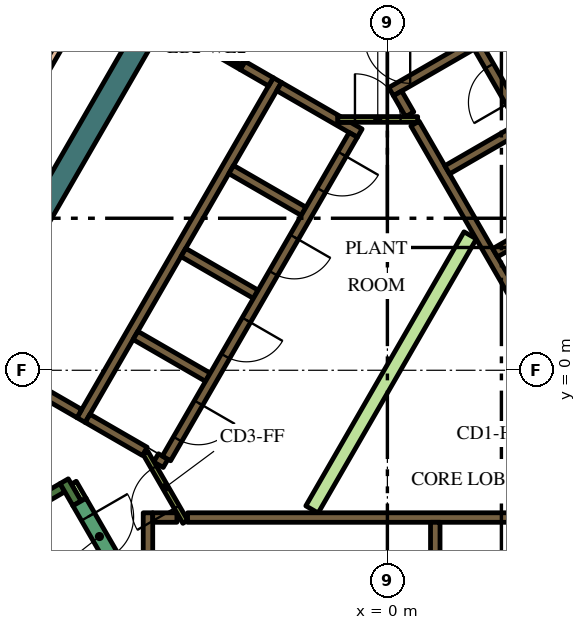
"""IFC4 building model, lengths in metres.
Left out: names, types, materials, properties, quantities, classifications, styles, units other than length and angle.
Written with IfcOpenShell. Run it as: python <this file> out.ifc"""

import sys

from ifc_helpers import new_model, si_unit, direction, frame, frame_2d, origin, place, context, subcontext, project, spatial, polyline, rectangle, outline, extrude, element, fill, save


model = new_model("IFC4")
c1 = context("Model", 3, precision=1e-05, world=origin(), true_north=direction((0.0, 1.0)))
c2 = subcontext(c1, "Body", "Model", "MODEL_VIEW")
j1 = project(units=[si_unit("LENGTHUNIT", "METRE"), si_unit("PLANEANGLEUNIT", "RADIAN")], contexts=[c1])
p1 = place(None, origin())
s1 = spatial("IfcSite", under=j1, at=p1, CompositionType="ELEMENT")
p2 = place(p1, origin())
s2 = spatial("IfcBuilding", under=s1, at=p2, CompositionType="ELEMENT")
p3 = place(p2, frame((0.0, 0.0, 336.0)))
s3 = spatial("IfcBuildingStorey", under=s2, at=p3, CompositionType="ELEMENT", Elevation=336.0)
p4 = place(p3, frame((-4.652, 11.842, 0.0), z_axis=(0.0, 0.0, 1.0), x_axis=(-0.500003640647, -0.866023301845, 0.0)))
e1 = element("IfcWall", 1, at=p4, inside=s3, PredefinedType="SOLIDWALL", context=c2, shape_type="SweptSolid", body=[
    extrude(rectangle(XDim=15.858, YDim=0.6, at=frame_2d((7.929, 0.0))), origin(), (0.0, 0.0, 1.0), 4.2),
])
p5 = place(p3, frame((-14.44, -6.49, 0.0), z_axis=(0.0, 0.0, 1.0), x_axis=(0.866022966069, 0.500004222222, 0.0)))
e2 = element("IfcWall", 2, at=p5, inside=s3, PredefinedType="SOLIDWALL", context=c2, shape_type="SweptSolid", body=[
    extrude(rectangle(XDim=6.8, YDim=0.25, at=frame_2d((3.4, 0.0))), origin(), (0.0, 0.0, 1.0), 4.2),
])
p6 = place(p3, frame((-8.168, -3.503, 0.0), z_axis=(0.0, 0.0, 1.0), x_axis=(-0.499952099219, 0.866053057547, 0.0)))
e3 = element("IfcWall", 3, at=p6, inside=s3, PredefinedType="SOLIDWALL", context=c2, shape_type="SweptSolid", body=[
    extrude(rectangle(XDim=0.675, YDim=0.25, at=frame_2d((0.337, 0.0))), origin(), (0.0, 0.0, 1.0), 4.2),
])
p7 = place(p3, frame((-5.259, -3.875, 0.0), z_axis=(0.0, 0.0, 1.0), x_axis=(1.0, 0.0, 0.0)))
e4 = element("IfcWall", 4, at=p7, inside=s3, PredefinedType="SOLIDWALL", context=c2, shape_type="SweptSolid", body=[
    extrude(rectangle(XDim=10.489, YDim=0.25, at=frame_2d((5.244, 0.0))), origin(), (0.0, 0.0, 1.0), 4.2),
])
p8 = place(p3, frame((1.26, -4.0, 0.0), z_axis=(0.0, 0.0, 1.0), x_axis=(0.0, -1.0, 0.0)))
e5 = element("IfcWall", 5, at=p8, inside=s3, PredefinedType="SOLIDWALL", context=c2, shape_type="SweptSolid", body=[
    extrude(rectangle(XDim=2.2, YDim=0.25, at=frame_2d((1.1, 0.0))), origin(), (0.0, 0.0, 1.0), 4.2),
])
p9 = place(p3, frame((-6.3, -7.125, 0.0), z_axis=(0.0, 0.0, 1.0), x_axis=(0.0, 1.0, 0.0)))
e6 = element("IfcWall", 6, at=p9, inside=s3, PredefinedType="SOLIDWALL", context=c2, shape_type="SweptSolid", body=[
    extrude(rectangle(XDim=3.375, YDim=0.25, at=frame_2d((1.687, 0.0))), origin(), (0.0, 0.0, 1.0), 4.2),
])
p10 = place(p3, frame((-6.175, -3.875, 0.0), z_axis=(0.0, 0.0, 1.0), x_axis=(1.0, 0.0, 0.0)))
e7 = element("IfcWall", 7, at=p10, inside=s3, PredefinedType="SOLIDWALL", context=c2, shape_type="SweptSolid", body=[
    extrude(rectangle(XDim=0.637, YDim=0.25, at=frame_2d((0.318, 0.0))), origin(), (0.0, 0.0, 1.0), 4.2),
])
p11 = place(p3, frame((3.647, 9.38, 0.0), z_axis=(0.0, 0.0, 1.0), x_axis=(-0.866027868628, -0.499995730742, 0.0)))
e8 = element("IfcWall", 8, at=p11, inside=s3, PredefinedType="SOLIDWALL", context=c2, shape_type="SweptSolid", body=[
    extrude(rectangle(XDim=4.099, YDim=0.25, at=frame_2d((2.049, 0.0))), origin(), (0.0, 0.0, 1.0), 4.2),
])
p12 = place(p3, frame((0.268, 7.285, 0.0), z_axis=(0.0, 0.0, 1.0), x_axis=(0.500098681536, -0.865968422476, 0.0)))
e9 = element("IfcWall", 9, at=p12, inside=s3, PredefinedType="SOLIDWALL", context=c2, shape_type="SweptSolid", body=[
    extrude(rectangle(XDim=0.636, YDim=0.25, at=frame_2d((0.318, 0.0))), origin(), (0.0, 0.0, 1.0), 4.2),
])
p13 = place(p3, frame((5.97, -2.591, 0.0), z_axis=(0.0, 0.0, 1.0), x_axis=(-0.499994469932, 0.866028596547, 0.0)))
e10 = element("IfcWall", 10, at=p13, inside=s3, PredefinedType="SOLIDWALL", context=c2, shape_type="SweptSolid", body=[
    extrude(rectangle(XDim=10.488, YDim=0.25, at=frame_2d((5.244, 0.0))), origin(), (0.0, 0.0, 1.0), 4.2),
])
p14 = place(p3, frame((1.574, 5.274, 0.0), z_axis=(0.0, 0.0, 1.0), x_axis=(0.866028486751, 0.499994660107, 0.0)))
e11 = element("IfcWall", 11, at=p14, inside=s3, PredefinedType="SOLIDWALL", context=c2, shape_type="SweptSolid", body=[
    extrude(rectangle(XDim=2.2, YDim=0.25, at=frame_2d((1.1, 0.0))), origin(), (0.0, 0.0, 1.0), 4.2),
])
p15 = place(p3, frame((2.834, 3.091, 0.0), z_axis=(0.0, 0.0, 1.0), x_axis=(0.866008176907, 0.50002983664, 0.0)))
e12 = element("IfcWall", 12, at=p15, inside=s3, PredefinedType="SOLIDWALL", context=c2, shape_type="SweptSolid", body=[
    extrude(rectangle(XDim=2.2, YDim=0.25, at=frame_2d((1.1, 0.0))), origin(), (0.0, 0.0, 1.0), 4.2),
])
p16 = place(p3, frame((-8.06, -1.311, 0.0), z_axis=(0.0, 0.0, 1.0), x_axis=(0.50000273126, 0.866023826885, 0.0)))
e13 = element("IfcWall", 13, at=p16, inside=s3, PredefinedType="SOLIDWALL", context=c2, shape_type="SweptSolid", body=[
    extrude(rectangle(XDim=10.33, YDim=0.25, at=frame_2d((5.165, 0.0))), origin(), (0.0, 0.0, 1.0), 4.2),
])
p17 = place(p3, origin())
e14 = element("IfcWall", 14, at=p17, inside=s3, PredefinedType="SOLIDWALL", context=c2, shape_type="SweptSolid", body=[
    extrude(outline(polyline([(-2.912, 7.356), (-2.787, 7.573), (-1.232, 6.675), (-1.303, 6.675), (-1.304, 6.675), (-1.304, 6.675), (-1.304, 6.525), (-1.304, 6.525), (-1.303, 6.525), (-0.971, 6.525), (-0.665, 6.348), (-0.79, 6.132), (-1.007, 6.257), (-1.007, 6.257), (-2.912, 7.356)])), origin(), (0.0, 0.0, 1.0), 4.2),
])
for number, where, z_axis, x_axis in (
    (15, (-2.204, 4.182, 0.0), (0.0, 0.0, 1.0), (-0.866, 0.5, 0.0)),
    (16, (-5.369, 3.1, 0.0), (0.0, 0.0, 1.0), (0.866, -0.5, 0.0)),
    (17, (-4.724, -0.182, 0.0), (0.0, 0.0, 1.0), (-0.866, 0.5, 0.0)),
):
    element("IfcWall", number, at=place(p3, frame(where, z_axis=z_axis, x_axis=x_axis)), inside=s3, PredefinedType="SOLIDWALL", context=c2, shape_type="SweptSolid", body=[
        extrude(rectangle(XDim=2.2, YDim=0.25, at=frame_2d((1.1, 0.0))), origin(), (0.0, 0.0, 1.0), 4.2),
    ])
p18 = place(p3, frame((-6.088, -2.305, 0.0), z_axis=(0.0, 0.0, 1.0), x_axis=(0.866059450854, -0.499941024108, 0.0)))
e18 = element("IfcWall", 18, at=p18, inside=s3, PredefinedType="SOLIDWALL", context=c2, shape_type="SweptSolid", body=[
    extrude(rectangle(XDim=0.29, YDim=0.25, at=frame_2d((0.145, 0.0))), origin(), (0.0, 0.0, 1.0), 4.2),
])
p19 = place(p3, frame((-7.889, -1.265, 0.0), z_axis=(0.0, 0.0, 1.0), x_axis=(0.865986741702, -0.500066958712, 0.0)))
e19 = element("IfcWall", 19, at=p19, inside=s3, PredefinedType="SOLIDWALL", context=c2, shape_type="SweptSolid", body=[
    extrude(rectangle(XDim=1.738, YDim=0.25, at=frame_2d((0.869, 0.0))), origin(), (0.0, 0.0, 1.0), 4.2),
])
p20 = place(p3, frame((-8.106, -1.14, 0.0), z_axis=(0.0, 0.0, 1.0), x_axis=(-0.866008981251, 0.500028443584, 0.0)))
e20 = element("IfcWall", 20, at=p20, inside=s3, PredefinedType="SOLIDWALL", context=c2, shape_type="SweptSolid", body=[
    extrude(rectangle(XDim=3.2, YDim=0.25, at=frame_2d((1.6, 0.0))), origin(), (0.0, 0.0, 1.0), 4.2),
])
p21 = place(p3, frame((-3.066, 7.59, 0.0), z_axis=(0.0, 0.0, 1.0), x_axis=(-0.866081358704, 0.49990307071, 0.0)))
e21 = element("IfcWall", 21, at=p21, inside=s3, PredefinedType="SOLIDWALL", context=c2, shape_type="SweptSolid", body=[
    extrude(rectangle(XDim=0.858, YDim=0.25, at=frame_2d((0.429, 0.0))), origin(), (0.0, 0.0, 1.0), 4.2),
])
e22 = element("IfcWall", 22, at=p17, inside=s3, PredefinedType="SOLIDWALL", context=c2, shape_type="SweptSolid", body=[
    extrude(outline(polyline([(-3.748, 8.128), (-3.813, 8.015), (-4.027, 8.139), (-4.017, 8.156), (-4.008, 8.173), (-4.0, 8.192), (-3.995, 8.21), (-3.991, 8.23), (-3.99, 8.25), (-3.99, 8.268), (-3.748, 8.128)])), origin(), (0.0, 0.0, 1.0), 4.2),
])
p22 = place(p3, frame((-8.252, -2.958, 0.0), z_axis=(0.0, 0.0, 1.0), x_axis=(0.500174715838, -0.865924508047, 0.0)))
e23 = element("IfcWall", 23, at=p22, inside=s3, PredefinedType="PARTITIONING", context=c2, shape_type="SweptSolid", body=[
    extrude(rectangle(XDim=0.514, YDim=0.15, at=frame_2d((0.257, 0.0))), origin(), (0.0, 0.0, 1.0), 3.45),
])
e24 = element("IfcWall", 24, at=p17, inside=s3, PredefinedType="PARTITIONING", context=c2, shape_type="SweptSolid", body=[
    extrude(outline(polyline([(2.017, 3.643), (2.342, 3.456), (-1.822, -3.756), (-2.147, -3.568), (2.017, 3.643)])), origin(), (0.0, 0.0, 1.0), 3.45),
])
p23 = place(p3, frame((8.565, -2.185, 0.0), z_axis=(0.0, 0.0, 1.0), x_axis=(-0.499997954832, 0.866026584559, 0.0)))
e25 = element("IfcWall", 25, at=p23, inside=s3, PredefinedType="SOLIDWALL", context=c2, shape_type="SweptSolid", body=[
    extrude(rectangle(XDim=12.35, YDim=0.25, at=frame_2d((6.175, 0.0))), origin(), (0.0, 0.0, 1.0), 4.2),
])
p24 = place(p23, frame((0.685, 0.0, 0.0)))
e26 = element("IfcOpeningElement", 26, at=p24, cuts=e25, PredefinedType="OPENING", context=c2, shape_type="SweptSolid", body=[
    extrude(rectangle(XDim=0.9, YDim=2.1, at=frame_2d((0.45, 1.05))), frame((0.0, 0.135, 0.0), z_axis=(0.0, -1.0, 0.0), x_axis=(1.0, 0.0, 0.0)), (0.0, 0.0, 1.0), 0.27),
])
p25 = place(p23, frame((3.105, 0.0, 0.0)))
e27 = element("IfcOpeningElement", 27, at=p25, cuts=e25, PredefinedType="OPENING", context=c2, shape_type="SweptSolid", body=[
    extrude(rectangle(XDim=1.1, YDim=2.1, at=frame_2d((0.55, 1.05))), frame((0.0, 0.135, 0.0), z_axis=(0.0, -1.0, 0.0), x_axis=(1.0, 0.0, 0.0)), (0.0, 0.0, 1.0), 0.27),
])
p26 = place(p23, frame((5.625, 0.0, 0.0)))
e28 = element("IfcOpeningElement", 28, at=p26, cuts=e25, PredefinedType="OPENING", context=c2, shape_type="SweptSolid", body=[
    extrude(rectangle(XDim=1.1, YDim=2.1, at=frame_2d((0.55, 1.05))), frame((0.0, 0.135, 0.0), z_axis=(0.0, -1.0, 0.0), x_axis=(1.0, 0.0, 0.0)), (0.0, 0.0, 1.0), 0.27),
])
p27 = place(p23, frame((8.145, 0.0, 0.0)))
e29 = element("IfcOpeningElement", 29, at=p27, cuts=e25, PredefinedType="OPENING", context=c2, shape_type="SweptSolid", body=[
    extrude(rectangle(XDim=1.1, YDim=2.1, at=frame_2d((0.55, 1.05))), frame((0.0, 0.135, 0.0), z_axis=(0.0, -1.0, 0.0), x_axis=(1.0, 0.0, 0.0)), (0.0, 0.0, 1.0), 0.27),
])
p28 = place(p23, frame((10.665, 0.0, 0.0)))
e30 = element("IfcOpeningElement", 30, at=p28, cuts=e25, PredefinedType="OPENING", context=c2, shape_type="SweptSolid", body=[
    extrude(rectangle(XDim=1.1, YDim=2.1, at=frame_2d((0.55, 1.05))), frame((0.0, 0.135, 0.0), z_axis=(0.0, -1.0, 0.0), x_axis=(1.0, 0.0, 0.0)), (0.0, 0.0, 1.0), 0.27),
])
p29 = place(p3, frame((-0.898, 6.194, 0.0), z_axis=(0.0, 0.0, 1.0), x_axis=(-0.499996202215, -0.866027596426, 0.0)))
e31 = element("IfcWall", 31, at=p29, inside=s3, PredefinedType="SOLIDWALL", context=c2, shape_type="SweptSolid", body=[
    extrude(rectangle(XDim=9.83, YDim=0.25, at=frame_2d((4.915, 0.0))), origin(), (0.0, 0.0, 1.0), 4.2),
])
p30 = place(p29, frame((0.585, 0.0, 0.0)))
e32 = element("IfcOpeningElement", 32, at=p30, cuts=e31, PredefinedType="OPENING", context=c2, shape_type="SweptSolid", body=[
    extrude(rectangle(XDim=1.1, YDim=2.1, at=frame_2d((0.55, 1.05))), frame((0.0, 0.135, 0.0), z_axis=(0.0, -1.0, 0.0), x_axis=(1.0, 0.0, 0.0)), (0.0, 0.0, 1.0), 0.27),
])
p31 = place(p29, frame((3.105, 0.0, 0.0)))
e33 = element("IfcOpeningElement", 33, at=p31, cuts=e31, PredefinedType="OPENING", context=c2, shape_type="SweptSolid", body=[
    extrude(rectangle(XDim=1.1, YDim=2.1, at=frame_2d((0.55, 1.05))), frame((0.0, 0.135, 0.0), z_axis=(0.0, -1.0, 0.0), x_axis=(1.0, 0.0, 0.0)), (0.0, 0.0, 1.0), 0.27),
])
p32 = place(p29, frame((5.625, 0.0, 0.0)))
e34 = element("IfcOpeningElement", 34, at=p32, cuts=e31, PredefinedType="OPENING", context=c2, shape_type="SweptSolid", body=[
    extrude(rectangle(XDim=1.1, YDim=2.1, at=frame_2d((0.55, 1.05))), frame((0.0, 0.135, 0.0), z_axis=(0.0, -1.0, 0.0), x_axis=(1.0, 0.0, 0.0)), (0.0, 0.0, 1.0), 0.27),
])
p33 = place(p29, frame((8.145, 0.0, 0.0)))
e35 = element("IfcOpeningElement", 35, at=p33, cuts=e31, PredefinedType="OPENING", context=c2, shape_type="SweptSolid", body=[
    extrude(rectangle(XDim=1.1, YDim=2.1, at=frame_2d((0.55, 1.05))), frame((0.0, 0.135, 0.0), z_axis=(0.0, -1.0, 0.0), x_axis=(1.0, 0.0, 0.0)), (0.0, 0.0, 1.0), 0.27),
])
p34 = place(p3, frame((-8.103, -3.466, 0.0), z_axis=(0.0, 0.0, 1.0), x_axis=(0.500078061341, -0.865980330357, 0.0)))
e36 = element("IfcWall", 36, at=p34, inside=s3, PredefinedType="SOLIDWALL", context=c2, shape_type="SweptSolid", body=[
    extrude(rectangle(XDim=2.1, YDim=0.4, at=frame_2d((1.05, 0.0))), origin(), (0.0, 0.0, 1.0), 4.2),
])
p35 = place(p34, frame((0.45, 0.0, 0.0)))
e37 = element("IfcOpeningElement", 37, at=p35, cuts=e36, PredefinedType="OPENING", context=c2, shape_type="SweptSolid", body=[
    extrude(rectangle(XDim=1.2, YDim=2.1, at=frame_2d((0.6, 1.05))), frame((0.0, 0.21, 0.0), z_axis=(0.0, -1.0, 0.0), x_axis=(1.0, 0.0, 0.0)), (0.0, 0.0, 1.0), 0.42),
])
p36 = place(p3, frame((-1.303, 6.6, 0.0), z_axis=(0.0, 0.0, 1.0), x_axis=(1.0, 0.0, 0.0)))
e38 = element("IfcWall", 38, at=p36, inside=s3, PredefinedType="PARTITIONING", context=c2, shape_type="SweptSolid", body=[
    extrude(rectangle(XDim=2.1, YDim=0.15, at=frame_2d((1.05, 0.0))), origin(), (0.0, 0.0, 1.0), 4.2),
])
p37 = place(p36, frame((0.45, 0.0, 0.0)))
e39 = element("IfcOpeningElement", 39, at=p37, cuts=e38, PredefinedType="OPENING", context=c2, shape_type="SweptSolid", body=[
    extrude(rectangle(XDim=1.2, YDim=2.1, at=frame_2d((0.6, 1.05))), frame((0.0, 0.085, 0.0), z_axis=(0.0, -1.0, 0.0), x_axis=(1.0, 0.0, 0.0)), (0.0, 0.0, 1.0), 0.17),
])
p38 = place(p3, frame((-5.317, -3.99, 0.0), z_axis=(0.0, 0.0, 1.0), x_axis=(-0.500027713859, 0.866009402589, 0.0)))
e40 = element("IfcWall", 40, at=p38, inside=s3, PredefinedType="PARTITIONING", context=c2, shape_type="SweptSolid", body=[
    extrude(rectangle(XDim=2.1, YDim=0.15, at=frame_2d((1.05, 0.0))), origin(), (0.0, 0.0, 1.0), 4.2),
])
p39 = place(p38, frame((0.45, 0.0, 0.0)))
e41 = element("IfcOpeningElement", 41, at=p39, cuts=e40, PredefinedType="OPENING", context=c2, shape_type="SweptSolid", body=[
    extrude(rectangle(XDim=1.2, YDim=2.1, at=frame_2d((0.6, 1.05))), frame((0.0, 0.085, 0.0), z_axis=(0.0, -1.0, 0.0), x_axis=(1.0, 0.0, 0.0)), (0.0, 0.0, 1.0), 0.17),
])
p40 = place(p3, frame((-5.659, 9.012, 0.0), z_axis=(0.0, 0.0, 1.0), x_axis=(0.866009402589, -0.500027713859, 0.0)))
e42 = element("IfcWall", 42, at=p40, inside=s3, PredefinedType="PARTITIONING", context=c2, shape_type="SweptSolid", body=[
    extrude(rectangle(XDim=2.1, YDim=0.12, at=frame_2d((1.05, 0.0))), origin(), (0.0, 0.0, 1.0), 3.45),
])
p41 = place(p40, frame((0.45, 0.0, 0.0)))
e43 = element("IfcOpeningElement", 43, at=p41, cuts=e42, PredefinedType="OPENING", context=c2, shape_type="SweptSolid", body=[
    extrude(rectangle(XDim=1.2, YDim=2.1, at=frame_2d((0.6, 1.05))), frame((0.0, 0.07, 0.0), z_axis=(0.0, -1.0, 0.0), x_axis=(1.0, 0.0, 0.0)), (0.0, 0.0, 1.0), 0.14),
])
p42 = place(p3, frame((-3.118, 18.1, 0.0), z_axis=(0.0, 0.0, 1.0), x_axis=(-0.499999609035, -0.866025629508, 0.0)))
e44 = element("IfcWall", 44, at=p42, inside=s3, PredefinedType="PARTITIONING", context=c2, shape_type="SweptSolid", body=[
    extrude(rectangle(XDim=14.106, YDim=0.2, at=frame_2d((7.053, 0.0))), origin(), (0.0, 0.0, 1.0), 3.45),
])
p43 = place(p42, frame((6.453, 0.0, 0.0)))
e45 = element("IfcOpeningElement", 45, at=p43, cuts=e44, PredefinedType="OPENING", context=c2, shape_type="SweptSolid", body=[
    extrude(rectangle(XDim=1.2, YDim=2.1, at=frame_2d((0.6, 1.05))), frame((0.0, 0.11, 0.0), z_axis=(0.0, -1.0, 0.0), x_axis=(1.0, 0.0, 0.0)), (0.0, 0.0, 1.0), 0.22),
])
p44 = place(p3, frame((10.171, 5.884, 0.0), z_axis=(0.0, 0.0, 1.0), x_axis=(-0.499999609035, 0.866025629508, 0.0)))
e46 = element("IfcWall", 46, at=p44, inside=s3, PredefinedType="PARTITIONING", context=c2, shape_type="SweptSolid", body=[
    extrude(rectangle(XDim=14.106, YDim=0.2, at=frame_2d((7.053, 0.0))), origin(), (0.0, 0.0, 1.0), 3.45),
])
p45 = place(p44, frame((6.453, 0.0, 0.0)))
e47 = element("IfcOpeningElement", 47, at=p45, cuts=e46, PredefinedType="OPENING", context=c2, shape_type="SweptSolid", body=[
    extrude(rectangle(XDim=1.2, YDim=2.1, at=frame_2d((0.6, 1.05))), frame((0.0, 0.11, 0.0), z_axis=(0.0, -1.0, 0.0), x_axis=(1.0, 0.0, 0.0)), (0.0, 0.0, 1.0), 0.22),
])
p46 = place(p3, frame((-7.54, 16.64, 0.0), z_axis=(0.0, 0.0, 1.0), x_axis=(-0.500002158106, -0.866024157798, 0.0)))
e48 = element("IfcWall", 48, at=p46, inside=s3, PredefinedType="SOLIDWALL", context=c2, shape_type="SweptSolid", body=[
    extrude(rectangle(XDim=21.282, YDim=0.3, at=frame_2d((10.641, 0.0))), origin(), (0.0, 0.0, 1.0), 3.45),
])
p47 = place(p28, origin())
e49 = element("IfcDoor", 49, at=p47, inside=s3, OperationType="DOUBLE_DOOR_SLIDING", PredefinedType="DOOR", context=c2, shape_type="SweptSolid", body=[
    extrude(rectangle(XDim=1.1, YDim=2.1, at=frame_2d((0.55, 1.05))), frame((0.0, 0.025, 0.0), z_axis=(0.0, -1.0, 0.0), x_axis=(1.0, 0.0, 0.0)), (0.0, 0.0, 1.0), 0.05),
])
fill(e30, e49)
p48 = place(p30, origin())
e50 = element("IfcDoor", 50, at=p48, inside=s3, OperationType="DOUBLE_DOOR_SLIDING", PredefinedType="DOOR", context=c2, shape_type="SweptSolid", body=[
    extrude(rectangle(XDim=1.1, YDim=2.1, at=frame_2d((0.55, 1.05))), frame((0.0, 0.025, 0.0), z_axis=(0.0, -1.0, 0.0), x_axis=(1.0, 0.0, 0.0)), (0.0, 0.0, 1.0), 0.05),
])
fill(e32, e50)
p49 = place(p31, origin())
e51 = element("IfcDoor", 51, at=p49, inside=s3, OperationType="DOUBLE_DOOR_SLIDING", PredefinedType="DOOR", context=c2, shape_type="SweptSolid", body=[
    extrude(rectangle(XDim=1.1, YDim=2.1, at=frame_2d((0.55, 1.05))), frame((0.0, 0.025, 0.0), z_axis=(0.0, -1.0, 0.0), x_axis=(1.0, 0.0, 0.0)), (0.0, 0.0, 1.0), 0.05),
])
fill(e33, e51)
p50 = place(p32, origin())
e52 = element("IfcDoor", 52, at=p50, inside=s3, OperationType="DOUBLE_DOOR_SLIDING", PredefinedType="DOOR", context=c2, shape_type="SweptSolid", body=[
    extrude(rectangle(XDim=1.1, YDim=2.1, at=frame_2d((0.55, 1.05))), frame((0.0, 0.025, 0.0), z_axis=(0.0, -1.0, 0.0), x_axis=(1.0, 0.0, 0.0)), (0.0, 0.0, 1.0), 0.05),
])
fill(e34, e52)
p51 = place(p33, origin())
e53 = element("IfcDoor", 53, at=p51, inside=s3, OperationType="DOUBLE_DOOR_SLIDING", PredefinedType="DOOR", context=c2, shape_type="SweptSolid", body=[
    extrude(rectangle(XDim=1.1, YDim=2.1, at=frame_2d((0.55, 1.05))), frame((0.0, 0.025, 0.0), z_axis=(0.0, -1.0, 0.0), x_axis=(1.0, 0.0, 0.0)), (0.0, 0.0, 1.0), 0.05),
])
fill(e35, e53)
p52 = place(p35, origin())
e54 = element("IfcDoor", 54, at=p52, inside=s3, OperationType="SINGLE_SWING_LEFT", PredefinedType="DOOR", context=c2, shape_type="SweptSolid", body=[
    extrude(rectangle(XDim=1.2, YDim=2.1, at=frame_2d((0.6, 1.05))), frame((0.0, 0.025, 0.0), z_axis=(0.0, -1.0, 0.0), x_axis=(1.0, 0.0, 0.0)), (0.0, 0.0, 1.0), 0.05),
])
fill(e37, e54)
p53 = place(p37, origin())
e55 = element("IfcDoor", 55, at=p53, inside=s3, OperationType="SINGLE_SWING_LEFT", PredefinedType="DOOR", context=c2, shape_type="SweptSolid", body=[
    extrude(rectangle(XDim=1.2, YDim=2.1, at=frame_2d((0.6, 1.05))), frame((0.0, 0.025, 0.0), z_axis=(0.0, -1.0, 0.0), x_axis=(1.0, 0.0, 0.0)), (0.0, 0.0, 1.0), 0.05),
])
fill(e39, e55)
p54 = place(p39, origin())
e56 = element("IfcDoor", 56, at=p54, inside=s3, OperationType="SINGLE_SWING_LEFT", PredefinedType="DOOR", context=c2, shape_type="SweptSolid", body=[
    extrude(rectangle(XDim=1.2, YDim=2.1, at=frame_2d((0.6, 1.05))), frame((0.0, 0.025, 0.0), z_axis=(0.0, -1.0, 0.0), x_axis=(1.0, 0.0, 0.0)), (0.0, 0.0, 1.0), 0.05),
])
fill(e41, e56)
p55 = place(p41, origin())
e57 = element("IfcDoor", 57, at=p55, inside=s3, OperationType="SINGLE_SWING_LEFT", PredefinedType="DOOR", context=c2, shape_type="SweptSolid", body=[
    extrude(rectangle(XDim=1.2, YDim=2.1, at=frame_2d((0.6, 1.05))), frame((0.0, 0.025, 0.0), z_axis=(0.0, -1.0, 0.0), x_axis=(1.0, 0.0, 0.0)), (0.0, 0.0, 1.0), 0.05),
])
fill(e43, e57)
save(model, sys.argv[1])
